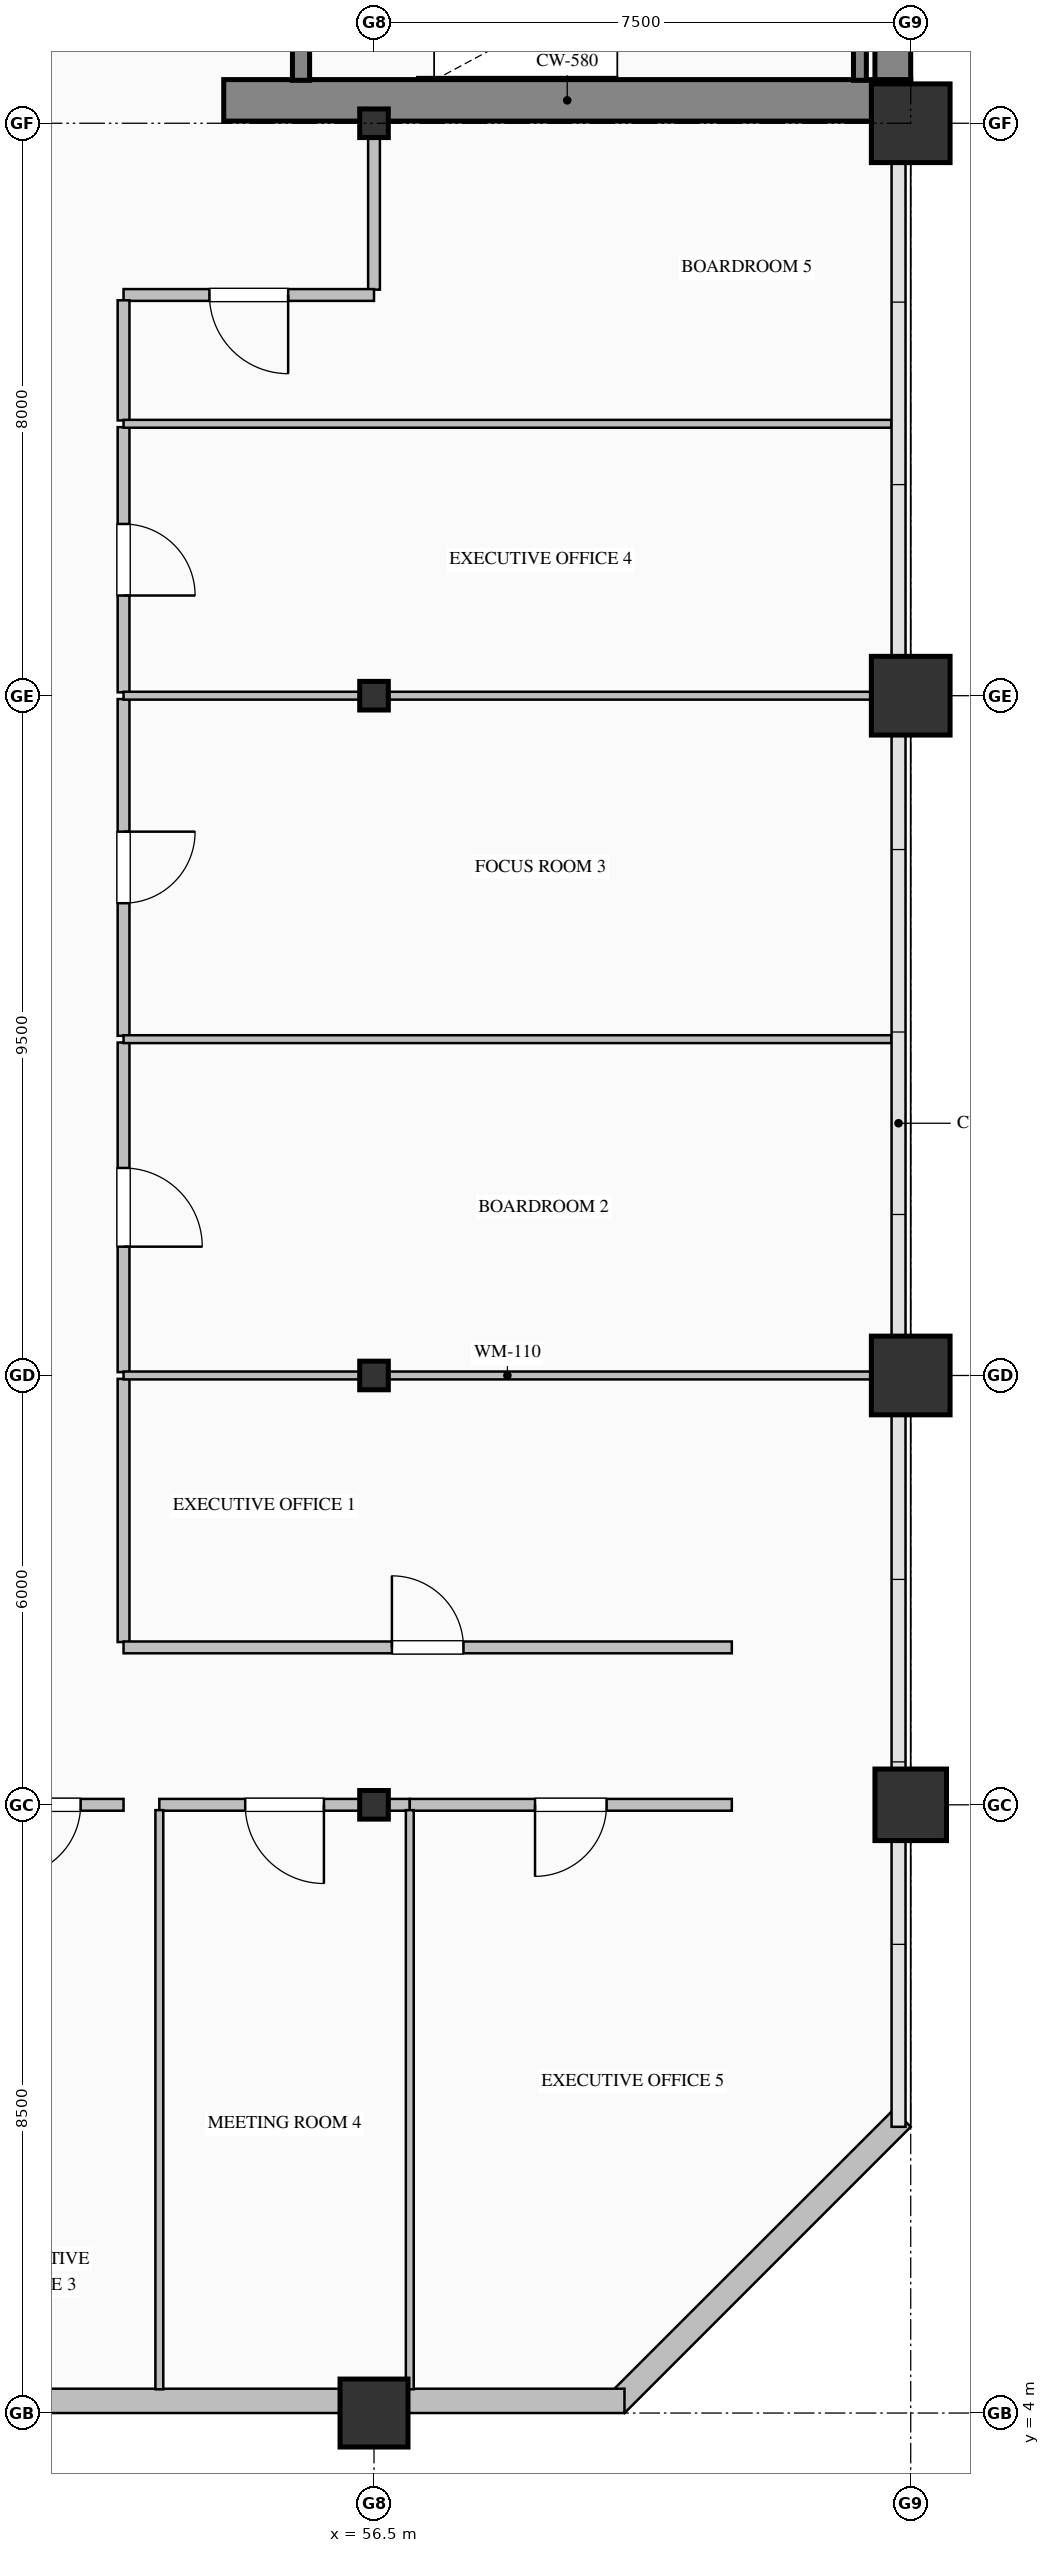
"""IFC4 building model, lengths in metres.
Left out: names, types, materials, properties, quantities, classifications, styles, units other than length and angle.
Written with IfcOpenShell. Run it as: python <this file> out.ifc"""

import sys

from ifc_helpers import new_model, si_unit, direction, frame, frame_2d, origin, origin_2d, place, context, subcontext, project, spatial, rectangle, hollow_rectangle, hollow_circle, i_section, extrude, element, fill, save


model = new_model("IFC4")
c1 = context("Model", 3, precision=1e-05, world=origin(), true_north=direction((0.0, 1.0)))
c2 = subcontext(c1, "Body", "Model", "MODEL_VIEW")
j1 = project(units=[si_unit("LENGTHUNIT", "METRE"), si_unit("PLANEANGLEUNIT", "RADIAN")], contexts=[c1])
p1 = place(None, origin())
s1 = spatial("IfcSite", under=j1, at=p1, CompositionType="ELEMENT")
p2 = place(p1, origin())
s2 = spatial("IfcBuilding", under=s1, at=p2, CompositionType="ELEMENT")
p3 = place(p2, frame((0.0, 0.0, 123.0)))
s3 = spatial("IfcBuildingStorey", under=s2, at=p3, CompositionType="ELEMENT", Elevation=123.0)
p4 = place(p3, frame((63.75, 36.32, 0.0), z_axis=(0.0, 0.0, 1.0), x_axis=(0.0, 1.0, 0.0)))
e1 = element("IfcWall", 1, at=p4, inside=s3, PredefinedType="SHEAR", context=c2, shape_type="SweptSolid", body=[
    extrude(rectangle(XDim=15.18, YDim=0.5, at=frame_2d((7.59, 0.0))), origin(), (0.0, 0.0, 1.0), 3.765),
])
p5 = place(p3, frame((54.4, 36.32, 0.0), z_axis=(0.0, 0.0, 1.0), x_axis=(1.0, 0.0, 0.0)))
e2 = element("IfcWall", 2, at=p5, inside=s3, PredefinedType="SHEAR", context=c2, shape_type="SweptSolid", body=[
    extrude(rectangle(XDim=9.6, YDim=0.58, at=frame_2d((4.8, 0.0))), origin(), (0.0, 0.0, 1.0), 4.0),
])
p6 = place(p3, frame((56.5, 4.0, 0.0), z_axis=(0.0, 0.0, 1.0), x_axis=(1.0, 0.0, 0.0)))
e3 = element("IfcColumn", 3, at=p6, inside=s3, PredefinedType="COLUMN", context=c2, shape_type="SweptSolid", body=[
    extrude(hollow_rectangle(XDim=0.95, YDim=0.95, WallThickness=0.036, at=origin_2d()), origin(), (0.0, 0.0, 1.0), 4.0),
])
for number, where, z_axis, x_axis in (
    (4, (56.5, 12.5, 0.0), (0.0, 0.0, 1.0), (1.0, 0.0, 0.0)),
    (5, (56.5, 18.5, 0.0), (0.0, 0.0, 1.0), (1.0, 0.0, 0.0)),
    (6, (56.5, 28.0, 0.0), (0.0, 0.0, 1.0), (1.0, 0.0, 0.0)),
    (7, (56.5, 36.0, 0.0), (0.0, 0.0, 1.0), (1.0, 0.0, 0.0)),
):
    element("IfcColumn", number, at=place(p3, frame(where, z_axis=z_axis, x_axis=x_axis)), inside=s3, PredefinedType="COLUMN", context=c2, shape_type="SweptSolid", body=[
        extrude(i_section(OverallWidth=0.4, OverallDepth=0.4, WebThickness=0.013, FlangeThickness=0.021, FilletRadius=0.022, at=origin_2d()), origin(), (0.0, 0.0, 1.0), 4.0),
    ])
p7 = place(p3, frame((64.0, 12.5, 0.0), z_axis=(0.0, 0.0, 1.0), x_axis=(1.0, 0.0, 0.0)))
e8 = element("IfcColumn", 8, at=p7, inside=s3, PredefinedType="COLUMN", context=c2, shape_type="SweptSolid", body=[
    extrude(hollow_circle(Radius=0.5, WallThickness=0.036, at=origin_2d()), origin(), (0.0, 0.0, 1.0), 4.0),
])
for number, where, z_axis, x_axis in (
    (9, (64.0, 18.5, 0.0), (0.0, 0.0, 1.0), (1.0, 0.0, 0.0)),
    (10, (64.0, 28.0, 0.0), (0.0, 0.0, 1.0), (1.0, 0.0, 0.0)),
    (11, (64.0, 36.0, 0.0), (0.0, 0.0, 1.0), (1.0, 0.0, 0.0)),
):
    element("IfcColumn", number, at=place(p3, frame(where, z_axis=z_axis, x_axis=x_axis)), inside=s3, PredefinedType="COLUMN", context=c2, shape_type="SweptSolid", body=[
        extrude(hollow_rectangle(XDim=1.1, YDim=1.1, WallThickness=0.04, at=origin_2d()), origin(), (0.0, 0.0, 1.0), 4.0),
    ])
p8 = place(p3, frame((63.88, 8.12, 0.0), z_axis=(0.0, 0.0, 1.0), x_axis=(-0.707106781187, -0.707106781187, 0.0)))
e12 = element("IfcWall", 12, at=p8, inside=s3, PredefinedType="SOLIDWALL", context=c2, shape_type="SweptSolid", body=[
    extrude(rectangle(XDim=5.657, YDim=0.34, at=frame_2d((2.828, 0.0))), origin(), (0.0, 0.0, 1.0), 3.765),
])
p9 = place(p3, frame((60.0, 4.17, 0.0), z_axis=(0.0, 0.0, 1.0), x_axis=(-1.0, 0.0, 0.0)))
e13 = element("IfcWall", 13, at=p9, inside=s3, PredefinedType="SOLIDWALL", context=c2, shape_type="SweptSolid", body=[
    extrude(rectangle(XDim=15.5, YDim=0.34, at=frame_2d((7.75, 0.0))), origin(), (0.0, 0.0, 1.0), 3.265),
])
p10 = place(p3, frame((55.48, 39.75, 0.0), z_axis=(0.0, 0.0, 1.0), x_axis=(0.0, -1.0, 0.0)))
e14 = element("IfcWall", 14, at=p10, inside=s3, PredefinedType="SOLIDWALL", context=c2, shape_type="SweptSolid", body=[
    extrude(rectangle(XDim=3.15, YDim=0.24, at=frame_2d((1.575, 0.0))), origin(), (0.0, 0.0, 1.0), 4.0),
])
p11 = place(p10, frame((1.0, 0.0, 0.0)))
e15 = element("IfcOpeningElement", 15, at=p11, cuts=e14, PredefinedType="OPENING", context=c2, shape_type="SweptSolid", body=[
    extrude(rectangle(XDim=1.15, YDim=2.2, at=frame_2d((0.575, 1.1))), frame((0.0, 0.13, 0.0), z_axis=(0.0, -1.0, 0.0), x_axis=(1.0, 0.0, 0.0)), (0.0, 0.0, 1.0), 0.26),
])
p12 = place(p3, frame((63.29, 36.6, 0.0), z_axis=(0.0, 0.0, 1.0), x_axis=(0.0, 1.0, 0.0)))
e16 = element("IfcWall", 16, at=p12, inside=s3, PredefinedType="SOLIDWALL", context=c2, shape_type="SweptSolid", body=[
    extrude(rectangle(XDim=3.15, YDim=0.18, at=frame_2d((1.575, 0.0))), origin(), (0.0, 0.0, 1.0), 4.0),
])
p13 = place(p3, frame((56.5, 36.0, 0.0), z_axis=(0.0, 0.0, 1.0), x_axis=(0.0, -1.0, 0.0)))
e17 = element("IfcWall", 17, at=p13, inside=s3, PredefinedType="PARTITIONING", context=c2, shape_type="SweptSolid", body=[
    extrude(rectangle(XDim=2.325, YDim=0.165, at=frame_2d((1.163, 0.0))), origin(), (0.0, 0.0, 1.0), 3.157),
])
p14 = place(p3, frame((56.5, 33.6, 0.0), z_axis=(0.0, 0.0, 1.0), x_axis=(-1.0, 0.0, 0.0)))
e18 = element("IfcWall", 18, at=p14, inside=s3, PredefinedType="PARTITIONING", context=c2, shape_type="SweptSolid", body=[
    extrude(rectangle(XDim=3.5, YDim=0.165, at=frame_2d((1.75, 0.0))), origin(), (0.0, 0.0, 1.0), 3.765),
])
p15 = place(p14, frame((1.2, 0.0, 0.0)))
e19 = element("IfcOpeningElement", 19, at=p15, cuts=e18, PredefinedType="OPENING", context=c2, shape_type="SweptSolid", body=[
    extrude(rectangle(XDim=1.1, YDim=2.2, at=frame_2d((0.55, 1.1))), frame((0.0, 0.093, 0.0), z_axis=(0.0, -1.0, 0.0), x_axis=(1.0, 0.0, 0.0)), (0.0, 0.0, 1.0), 0.185),
])
p16 = place(p3, frame((53.0, 18.453, 0.0), z_axis=(0.0, 0.0, 1.0), x_axis=(0.0, -1.0, 0.0)))
e20 = element("IfcWall", 20, at=p16, inside=s3, PredefinedType="PARTITIONING", context=c2, shape_type="SweptSolid", body=[
    extrude(rectangle(XDim=3.678, YDim=0.165, at=frame_2d((1.839, 0.0))), origin(), (0.0, 0.0, 1.0), 3.765),
])
p17 = place(p3, frame((53.0, 23.153, 0.0), z_axis=(0.0, 0.0, 1.0), x_axis=(0.0, -1.0, 0.0)))
e21 = element("IfcWall", 21, at=p17, inside=s3, PredefinedType="PARTITIONING", context=c2, shape_type="SweptSolid", body=[
    extrude(rectangle(XDim=4.606, YDim=0.165, at=frame_2d((2.303, 0.0))), origin(), (0.0, 0.0, 1.0), 3.765),
])
p18 = place(p17, frame((1.753, 0.0, 0.0)))
e22 = element("IfcOpeningElement", 22, at=p18, cuts=e21, PredefinedType="OPENING", context=c2, shape_type="SweptSolid", body=[
    extrude(rectangle(XDim=1.1, YDim=2.2, at=frame_2d((0.55, 1.1))), frame((0.0, 0.093, 0.0), z_axis=(0.0, -1.0, 0.0), x_axis=(1.0, 0.0, 0.0)), (0.0, 0.0, 1.0), 0.185),
])
p19 = place(p3, frame((53.0, 27.953, 0.0), z_axis=(0.0, 0.0, 1.0), x_axis=(0.0, -1.0, 0.0)))
e23 = element("IfcWall", 23, at=p19, inside=s3, PredefinedType="PARTITIONING", context=c2, shape_type="SweptSolid", body=[
    extrude(rectangle(XDim=4.706, YDim=0.165, at=frame_2d((2.353, 0.0))), origin(), (0.0, 0.0, 1.0), 3.765),
])
p20 = place(p19, frame((1.853, 0.0, 0.0)))
e24 = element("IfcOpeningElement", 24, at=p20, cuts=e23, PredefinedType="OPENING", context=c2, shape_type="SweptSolid", body=[
    extrude(rectangle(XDim=1.0, YDim=2.15, at=frame_2d((0.5, 1.075))), frame((0.0, 0.093, 0.0), z_axis=(0.0, -1.0, 0.0), x_axis=(1.0, 0.0, 0.0)), (0.0, 0.0, 1.0), 0.185),
])
p21 = place(p3, frame((53.0, 31.753, 0.0), z_axis=(0.0, 0.0, 1.0), x_axis=(0.0, -1.0, 0.0)))
e25 = element("IfcWall", 25, at=p21, inside=s3, PredefinedType="PARTITIONING", context=c2, shape_type="SweptSolid", body=[
    extrude(rectangle(XDim=3.706, YDim=0.165, at=frame_2d((1.853, 0.0))), origin(), (0.0, 0.0, 1.0), 3.765),
])
p22 = place(p21, frame((1.353, 0.0, 0.0)))
e26 = element("IfcOpeningElement", 26, at=p22, cuts=e25, PredefinedType="OPENING", context=c2, shape_type="SweptSolid", body=[
    extrude(rectangle(XDim=1.0, YDim=2.15, at=frame_2d((0.5, 1.075))), frame((0.0, 0.093, 0.0), z_axis=(0.0, -1.0, 0.0), x_axis=(1.0, 0.0, 0.0)), (0.0, 0.0, 1.0), 0.185),
])
p23 = place(p3, frame((53.0, 33.525, 0.0), z_axis=(0.0, 0.0, 1.0), x_axis=(0.0, -1.0, 0.0)))
e27 = element("IfcWall", 27, at=p23, inside=s3, PredefinedType="PARTITIONING", context=c2, shape_type="SweptSolid", body=[
    extrude(rectangle(XDim=1.678, YDim=0.165, at=frame_2d((0.839, 0.0))), origin(), (0.0, 0.0, 1.0), 3.765),
])
p24 = place(p3, frame((53.0, 12.5, 0.0), z_axis=(0.0, 0.0, 1.0), x_axis=(-1.0, 0.0, 0.0)))
e28 = element("IfcWall", 28, at=p24, inside=s3, PredefinedType="PARTITIONING", context=c2, shape_type="SweptSolid", body=[
    extrude(rectangle(XDim=2.2, YDim=0.165, at=frame_2d((1.1, 0.0))), origin(), (0.0, 0.0, 1.0), 3.157),
])
p25 = place(p24, frame((0.6, 0.0, 0.0)))
e29 = element("IfcOpeningElement", 29, at=p25, cuts=e28, PredefinedType="OPENING", context=c2, shape_type="SweptSolid", body=[
    extrude(rectangle(XDim=1.0, YDim=2.15, at=frame_2d((0.5, 1.075))), frame((0.0, 0.093, 0.0), z_axis=(0.0, -1.0, 0.0), x_axis=(1.0, 0.0, 0.0)), (0.0, 0.0, 1.0), 0.185),
])
p26 = place(p3, frame((53.0, 14.7, 0.0), z_axis=(0.0, 0.0, 1.0), x_axis=(1.0, 0.0, 0.0)))
e30 = element("IfcWall", 30, at=p26, inside=s3, PredefinedType="PARTITIONING", context=c2, shape_type="SweptSolid", body=[
    extrude(rectangle(XDim=8.5, YDim=0.165, at=frame_2d((4.25, 0.0))), origin(), (0.0, 0.0, 1.0), 3.765),
])
p27 = place(p26, frame((3.75, 0.0, 0.0)))
e31 = element("IfcOpeningElement", 31, at=p27, cuts=e30, PredefinedType="OPENING", context=c2, shape_type="SweptSolid", body=[
    extrude(rectangle(XDim=1.0, YDim=2.15, at=frame_2d((0.5, 1.075))), frame((0.0, 0.093, 0.0), z_axis=(0.0, -1.0, 0.0), x_axis=(1.0, 0.0, 0.0)), (0.0, 0.0, 1.0), 0.185),
])
p28 = place(p3, frame((57.0, 12.5, 0.0), z_axis=(0.0, 0.0, 1.0), x_axis=(-1.0, 0.0, 0.0)))
e32 = element("IfcWall", 32, at=p28, inside=s3, PredefinedType="PARTITIONING", context=c2, shape_type="SweptSolid", body=[
    extrude(rectangle(XDim=3.5, YDim=0.165, at=frame_2d((1.75, 0.0))), origin(), (0.0, 0.0, 1.0), 3.157),
])
p29 = place(p28, frame((1.2, 0.0, 0.0)))
e33 = element("IfcOpeningElement", 33, at=p29, cuts=e32, PredefinedType="OPENING", context=c2, shape_type="SweptSolid", body=[
    extrude(rectangle(XDim=1.1, YDim=2.2, at=frame_2d((0.55, 1.1))), frame((0.0, 0.093, 0.0), z_axis=(0.0, -1.0, 0.0), x_axis=(1.0, 0.0, 0.0)), (0.0, 0.0, 1.0), 0.185),
])
p30 = place(p3, frame((61.5, 12.5, 0.0), z_axis=(0.0, 0.0, 1.0), x_axis=(-1.0, 0.0, 0.0)))
e34 = element("IfcWall", 34, at=p30, inside=s3, PredefinedType="PARTITIONING", context=c2, shape_type="SweptSolid", body=[
    extrude(rectangle(XDim=4.5, YDim=0.165, at=frame_2d((2.25, 0.0))), origin(), (0.0, 0.0, 1.0), 3.157),
])
p31 = place(p30, frame((1.75, 0.0, 0.0)))
e35 = element("IfcOpeningElement", 35, at=p31, cuts=e34, PredefinedType="OPENING", context=c2, shape_type="SweptSolid", body=[
    extrude(rectangle(XDim=1.0, YDim=2.15, at=frame_2d((0.5, 1.075))), frame((0.0, 0.093, 0.0), z_axis=(0.0, -1.0, 0.0), x_axis=(1.0, 0.0, 0.0)), (0.0, 0.0, 1.0), 0.185),
])
p32 = place(p3, frame((53.0, 18.5, 0.0), z_axis=(0.0, 0.0, 1.0), x_axis=(1.0, 0.0, 0.0)))
e36 = element("IfcWall", 36, at=p32, inside=s3, PredefinedType="MOVABLE", context=c2, shape_type="SweptSolid", body=[
    extrude(rectangle(XDim=10.728, YDim=0.11, at=frame_2d((5.364, 0.0))), origin(), (0.0, 0.0, 1.0), 3.157),
])
p33 = place(p3, frame((53.0, 23.2, 0.0), z_axis=(0.0, 0.0, 1.0), x_axis=(1.0, 0.0, 0.0)))
e37 = element("IfcWall", 37, at=p33, inside=s3, PredefinedType="MOVABLE", context=c2, shape_type="SweptSolid", body=[
    extrude(rectangle(XDim=10.728, YDim=0.11, at=frame_2d((5.364, 0.0))), origin(), (0.0, 0.0, 1.0), 3.407),
])
p34 = place(p3, frame((53.0, 28.0, 0.0), z_axis=(0.0, 0.0, 1.0), x_axis=(1.0, 0.0, 0.0)))
e38 = element("IfcWall", 38, at=p34, inside=s3, PredefinedType="MOVABLE", context=c2, shape_type="SweptSolid", body=[
    extrude(rectangle(XDim=10.728, YDim=0.11, at=frame_2d((5.364, 0.0))), origin(), (0.0, 0.0, 1.0), 3.157),
])
p35 = place(p3, frame((53.0, 31.8, 0.0), z_axis=(0.0, 0.0, 1.0), x_axis=(1.0, 0.0, 0.0)))
e39 = element("IfcWall", 39, at=p35, inside=s3, PredefinedType="MOVABLE", context=c2, shape_type="SweptSolid", body=[
    extrude(rectangle(XDim=10.728, YDim=0.11, at=frame_2d((5.364, 0.0))), origin(), (0.0, 0.0, 1.0), 3.765),
])
for number, where, z_axis, x_axis in (
    (40, (53.5, 12.426, 0.0), (0.0, 0.0, 1.0), (0.0, -1.0, 0.0)),
    (41, (57.0, 12.426, 0.0), (0.0, 0.0, 1.0), (0.0, -1.0, 0.0)),
):
    element("IfcWall", number, at=place(p3, frame(where, z_axis=z_axis, x_axis=x_axis)), inside=s3, PredefinedType="MOVABLE", context=c2, shape_type="SweptSolid", body=[
        extrude(rectangle(XDim=8.094, YDim=0.11, at=frame_2d((4.047, 0.0))), origin(), (0.0, 0.0, 1.0), 3.765),
    ])
p36 = place(p27, origin())
e42 = element("IfcDoor", 42, at=p36, inside=s3, OperationType="SINGLE_SWING_LEFT", PredefinedType="DOOR", context=c2, shape_type="SweptSolid", body=[
    extrude(rectangle(XDim=1.0, YDim=2.15, at=frame_2d((0.5, 1.075))), frame((0.0, 0.025, 0.0), z_axis=(0.0, -1.0, 0.0), x_axis=(1.0, 0.0, 0.0)), (0.0, 0.0, 1.0), 0.05),
])
fill(e31, e42)
p37 = place(p18, origin())
e43 = element("IfcDoor", 43, at=p37, inside=s3, OperationType="SINGLE_SWING_RIGHT", PredefinedType="DOOR", context=c2, shape_type="SweptSolid", body=[
    extrude(rectangle(XDim=1.1, YDim=2.2, at=frame_2d((0.55, 1.1))), frame((0.0, 0.025, 0.0), z_axis=(0.0, -1.0, 0.0), x_axis=(1.0, 0.0, 0.0)), (0.0, 0.0, 1.0), 0.05),
])
fill(e22, e43)
p38 = place(p20, origin())
e44 = element("IfcDoor", 44, at=p38, inside=s3, OperationType="SINGLE_SWING_LEFT", PredefinedType="DOOR", context=c2, shape_type="SweptSolid", body=[
    extrude(rectangle(XDim=1.0, YDim=2.15, at=frame_2d((0.5, 1.075))), frame((0.0, 0.025, 0.0), z_axis=(0.0, -1.0, 0.0), x_axis=(1.0, 0.0, 0.0)), (0.0, 0.0, 1.0), 0.05),
])
fill(e24, e44)
p39 = place(p22, origin())
e45 = element("IfcDoor", 45, at=p39, inside=s3, OperationType="SINGLE_SWING_RIGHT", PredefinedType="DOOR", context=c2, shape_type="SweptSolid", body=[
    extrude(rectangle(XDim=1.0, YDim=2.15, at=frame_2d((0.5, 1.075))), frame((0.0, 0.025, 0.0), z_axis=(0.0, -1.0, 0.0), x_axis=(1.0, 0.0, 0.0)), (0.0, 0.0, 1.0), 0.05),
])
fill(e26, e45)
p40 = place(p15, origin())
e46 = element("IfcDoor", 46, at=p40, inside=s3, OperationType="SINGLE_SWING_LEFT", PredefinedType="DOOR", context=c2, shape_type="SweptSolid", body=[
    extrude(rectangle(XDim=1.1, YDim=2.2, at=frame_2d((0.55, 1.1))), frame((0.0, 0.025, 0.0), z_axis=(0.0, -1.0, 0.0), x_axis=(1.0, 0.0, 0.0)), (0.0, 0.0, 1.0), 0.05),
])
fill(e19, e46)
p41 = place(p25, origin())
e47 = element("IfcDoor", 47, at=p41, inside=s3, OperationType="SINGLE_SWING_RIGHT", PredefinedType="DOOR", context=c2, shape_type="SweptSolid", body=[
    extrude(rectangle(XDim=1.0, YDim=2.15, at=frame_2d((0.5, 1.075))), frame((0.0, 0.025, 0.0), z_axis=(0.0, -1.0, 0.0), x_axis=(1.0, 0.0, 0.0)), (0.0, 0.0, 1.0), 0.05),
])
fill(e29, e47)
p42 = place(p29, origin())
e48 = element("IfcDoor", 48, at=p42, inside=s3, OperationType="SINGLE_SWING_LEFT", PredefinedType="DOOR", context=c2, shape_type="SweptSolid", body=[
    extrude(rectangle(XDim=1.1, YDim=2.2, at=frame_2d((0.55, 1.1))), frame((0.0, 0.025, 0.0), z_axis=(0.0, -1.0, 0.0), x_axis=(1.0, 0.0, 0.0)), (0.0, 0.0, 1.0), 0.05),
])
fill(e33, e48)
p43 = place(p31, origin())
e49 = element("IfcDoor", 49, at=p43, inside=s3, OperationType="SINGLE_SWING_RIGHT", PredefinedType="DOOR", context=c2, shape_type="SweptSolid", body=[
    extrude(rectangle(XDim=1.0, YDim=2.15, at=frame_2d((0.5, 1.075))), frame((0.0, 0.025, 0.0), z_axis=(0.0, -1.0, 0.0), x_axis=(1.0, 0.0, 0.0)), (0.0, 0.0, 1.0), 0.05),
])
fill(e35, e49)
save(model, sys.argv[1])
